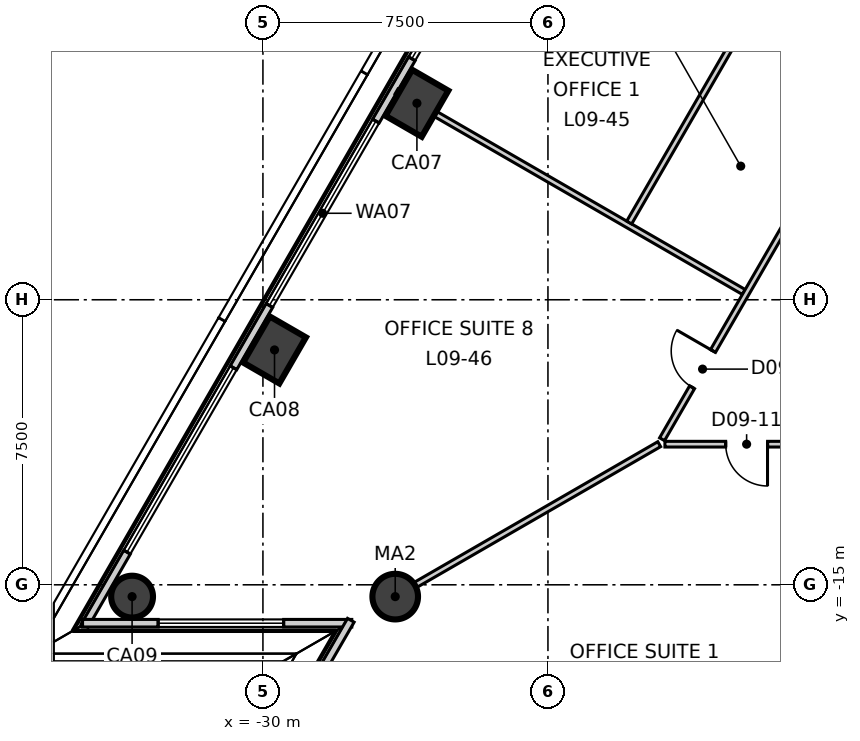
"""IFC4 building model, lengths in metres.
Left out: names, types, materials, properties, quantities, classifications, styles, units other than length and angle.
Written with IfcOpenShell. Run it as: python <this file> out.ifc"""

import sys

from ifc_helpers import new_model, si_unit, direction, frame, frame_2d, origin, origin_2d, place, context, subcontext, project, spatial, rectangle, circle, extrude, element, fill, save


model = new_model("IFC4")
c1 = context("Model", 3, precision=1e-05, world=origin(), true_north=direction((0.0, 1.0)))
c2 = subcontext(c1, "Body", "Model", "MODEL_VIEW")
j1 = project(units=[si_unit("LENGTHUNIT", "METRE"), si_unit("PLANEANGLEUNIT", "RADIAN")], contexts=[c1])
p1 = place(None, origin())
s1 = spatial("IfcSite", under=j1, at=p1, CompositionType="ELEMENT")
p2 = place(p1, origin())
s2 = spatial("IfcBuilding", under=s1, at=p2, CompositionType="ELEMENT")
p3 = place(p2, frame((0.0, 0.0, 47.3)))
s3 = spatial("IfcBuildingStorey", under=s2, at=p3, CompositionType="ELEMENT", Elevation=47.3)
for number, where, z_axis, x_axis in (
    (1, (-25.948, -2.329, -0.3), (0.0, 0.0, 1.0), (0.5, 0.866, 0.0)),
    (2, (-29.695, -8.82, -0.3), (0.0, 0.0, 1.0), (0.5, 0.866, 0.0)),
):
    element("IfcColumn", number, at=place(p3, frame(where, z_axis=z_axis, x_axis=x_axis)), inside=s3, PredefinedType="COLUMN", context=c2, shape_type="SweptSolid", body=[
        extrude(rectangle(XDim=1.4, YDim=1.1, at=origin_2d()), origin(), (0.0, 0.0, 1.0), 4.0),
    ])
p4 = place(p3, frame((-33.443, -15.311, -0.3), z_axis=(0.0, 0.0, 1.0), x_axis=(0.5, 0.866025403784, 0.0)))
e3 = element("IfcColumn", 3, at=p4, inside=s3, PredefinedType="COLUMN", context=c2, shape_type="SweptSolid", body=[
    extrude(circle(Radius=0.55, at=origin_2d()), origin(), (0.0, 0.0, 1.0), 4.0),
])
p5 = place(p3, frame((-26.519, -15.311, -0.3), z_axis=(0.0, 0.0, 1.0), x_axis=(1.0, 0.0, 0.0)))
e4 = element("IfcColumn", 4, at=p5, inside=s3, PredefinedType="COLUMN", context=c2, shape_type="SweptSolid", body=[
    extrude(circle(Radius=0.6, at=origin_2d()), origin(), (0.0, 0.0, 1.0), 4.0),
])
p6 = place(p3, frame((-3.417, 38.096, 0.0), z_axis=(0.0, 0.0, 1.0), x_axis=(-0.500000412988, -0.866025165346, 0.0)))
e5 = element("IfcWall", 5, at=p6, inside=s3, PredefinedType="ELEMENTEDWALL", context=c2, shape_type="SweptSolid", body=[
    extrude(rectangle(XDim=62.548, YDim=0.2, at=frame_2d((31.274, 0.0))), origin(), (0.0, 0.0, 1.0), 3.7),
])
p7 = place(p6, frame((2.25, 0.0, 0.9)))
e6 = element("IfcOpeningElement", 6, at=p7, cuts=e5, PredefinedType="OPENING", context=c2, shape_type="SweptSolid", body=[
    extrude(rectangle(XDim=5.6, YDim=2.5, at=frame_2d((2.8, 1.25))), frame((0.0, 0.11, 0.0), z_axis=(0.0, -1.0, 0.0), x_axis=(1.0, 0.0, 0.0)), (0.0, 0.0, 1.0), 0.22),
])
p8 = place(p6, frame((9.745, 0.0, 0.9)))
e7 = element("IfcOpeningElement", 7, at=p8, cuts=e5, PredefinedType="OPENING", context=c2, shape_type="SweptSolid", body=[
    extrude(rectangle(XDim=5.6, YDim=2.5, at=frame_2d((2.8, 1.25))), frame((0.0, 0.11, 0.0), z_axis=(0.0, -1.0, 0.0), x_axis=(1.0, 0.0, 0.0)), (0.0, 0.0, 1.0), 0.22),
])
p9 = place(p6, frame((17.241, 0.0, 0.9)))
e8 = element("IfcOpeningElement", 8, at=p9, cuts=e5, PredefinedType="OPENING", context=c2, shape_type="SweptSolid", body=[
    extrude(rectangle(XDim=5.6, YDim=2.5, at=frame_2d((2.8, 1.25))), frame((0.0, 0.11, 0.0), z_axis=(0.0, -1.0, 0.0), x_axis=(1.0, 0.0, 0.0)), (0.0, 0.0, 1.0), 0.22),
])
p10 = place(p6, frame((24.736, 0.0, 0.9)))
e9 = element("IfcOpeningElement", 9, at=p10, cuts=e5, PredefinedType="OPENING", context=c2, shape_type="SweptSolid", body=[
    extrude(rectangle(XDim=5.6, YDim=2.5, at=frame_2d((2.8, 1.25))), frame((0.0, 0.11, 0.0), z_axis=(0.0, -1.0, 0.0), x_axis=(1.0, 0.0, 0.0)), (0.0, 0.0, 1.0), 0.22),
])
p11 = place(p6, frame((32.231, 0.0, 0.9)))
e10 = element("IfcOpeningElement", 10, at=p11, cuts=e5, PredefinedType="OPENING", context=c2, shape_type="SweptSolid", body=[
    extrude(rectangle(XDim=5.6, YDim=2.5, at=frame_2d((2.8, 1.25))), frame((0.0, 0.11, 0.0), z_axis=(0.0, -1.0, 0.0), x_axis=(1.0, 0.0, 0.0)), (0.0, 0.0, 1.0), 0.22),
])
p12 = place(p6, frame((39.727, 0.0, 0.9)))
e11 = element("IfcOpeningElement", 11, at=p12, cuts=e5, PredefinedType="OPENING", context=c2, shape_type="SweptSolid", body=[
    extrude(rectangle(XDim=5.6, YDim=2.5, at=frame_2d((2.8, 1.25))), frame((0.0, 0.11, 0.0), z_axis=(0.0, -1.0, 0.0), x_axis=(1.0, 0.0, 0.0)), (0.0, 0.0, 1.0), 0.22),
])
p13 = place(p6, frame((47.222, 0.0, 0.9)))
e12 = element("IfcOpeningElement", 12, at=p13, cuts=e5, PredefinedType="OPENING", context=c2, shape_type="SweptSolid", body=[
    extrude(rectangle(XDim=5.6, YDim=2.5, at=frame_2d((2.8, 1.25))), frame((0.0, 0.11, 0.0), z_axis=(0.0, -1.0, 0.0), x_axis=(1.0, 0.0, 0.0)), (0.0, 0.0, 1.0), 0.22),
])
p14 = place(p6, frame((54.717, 0.0, 0.9)))
e13 = element("IfcOpeningElement", 13, at=p14, cuts=e5, PredefinedType="OPENING", context=c2, shape_type="SweptSolid", body=[
    extrude(rectangle(XDim=5.6, YDim=2.5, at=frame_2d((2.8, 1.25))), frame((0.0, 0.11, 0.0), z_axis=(0.0, -1.0, 0.0), x_axis=(1.0, 0.0, 0.0)), (0.0, 0.0, 1.0), 0.22),
])
p15 = place(p3, frame((-34.746, -16.011, 0.0), z_axis=(0.0, 0.0, 1.0), x_axis=(1.0, 0.0, 0.0)))
e14 = element("IfcWall", 14, at=p15, inside=s3, PredefinedType="ELEMENTEDWALL", context=c2, shape_type="SweptSolid", body=[
    extrude(rectangle(XDim=7.084, YDim=0.2, at=frame_2d((3.542, 0.0))), origin(), (0.0, 0.0, 1.0), 3.7),
])
p16 = place(p15, frame((1.99, 0.0, 0.9)))
e15 = element("IfcOpeningElement", 15, at=p16, cuts=e14, PredefinedType="OPENING", context=c2, shape_type="SweptSolid", body=[
    extrude(rectangle(XDim=3.3, YDim=2.5, at=frame_2d((1.65, 1.25))), frame((0.0, 0.11, 0.0), z_axis=(0.0, -1.0, 0.0), x_axis=(1.0, 0.0, 0.0)), (0.0, 0.0, 1.0), 0.22),
])
p17 = place(p3, frame((-27.687, -15.933, 0.0), z_axis=(0.0, 0.0, 1.0), x_axis=(-0.499993928037, -0.866028909405, 0.0)))
e16 = element("IfcWall", 16, at=p17, inside=s3, PredefinedType="ELEMENTEDWALL", context=c2, shape_type="SweptSolid", body=[
    extrude(rectangle(XDim=7.084, YDim=0.2, at=frame_2d((3.542, 0.0))), origin(), (0.0, 0.0, 1.0), 3.7),
])
p18 = place(p17, frame((1.39, 0.0, 0.9)))
e17 = element("IfcOpeningElement", 17, at=p18, cuts=e16, PredefinedType="OPENING", context=c2, shape_type="SweptSolid", body=[
    extrude(rectangle(XDim=3.3, YDim=2.5, at=frame_2d((1.65, 1.25))), frame((0.0, 0.11, 0.0), z_axis=(0.0, -1.0, 0.0), x_axis=(1.0, 0.0, 0.0)), (0.0, 0.0, 1.0), 0.22),
])
p19 = place(p3, frame((-27.056, -15.621, 0.0), z_axis=(0.0, 0.0, 1.0), x_axis=(0.866014334421, 0.50001917221, 0.0)))
e18 = element("IfcWall", 18, at=p19, inside=s3, PredefinedType="PARTITIONING", context=c2, shape_type="SweptSolid", body=[
    extrude(rectangle(XDim=8.642, YDim=0.15, at=frame_2d((4.321, 0.0))), origin(), (0.0, 0.0, 1.0), 3.1),
])
p20 = place(p3, frame((-26.485, -2.019, 0.0), z_axis=(0.0, 0.0, 1.0), x_axis=(0.866027613664, -0.499996172356, 0.0)))
e19 = element("IfcWall", 19, at=p20, inside=s3, PredefinedType="PARTITIONING", context=c2, shape_type="SweptSolid", body=[
    extrude(rectangle(XDim=10.552, YDim=0.15, at=frame_2d((5.276, 0.0))), origin(), (0.0, 0.0, 1.0), 3.7),
])
p21 = place(p3, frame((-19.497, -11.17, 0.0), z_axis=(0.0, 0.0, 1.0), x_axis=(0.499998854553, 0.866026065108, 0.0)))
e20 = element("IfcWall", 20, at=p21, inside=s3, PredefinedType="PARTITIONING", context=c2, shape_type="SweptSolid", body=[
    extrude(rectangle(XDim=38.994, YDim=0.15, at=frame_2d((19.497, 0.0))), origin(), (0.0, 0.0, 1.0), 3.7),
])
p22 = place(p21, frame((36.144, 0.0, 0.0)))
e21 = element("IfcOpeningElement", 21, at=p22, cuts=e20, PredefinedType="OPENING", context=c2, shape_type="SweptSolid", body=[
    extrude(rectangle(XDim=1.1, YDim=2.1, at=frame_2d((0.55, 1.05))), frame((0.0, 0.085, 0.0), z_axis=(0.0, -1.0, 0.0), x_axis=(1.0, 0.0, 0.0)), (0.0, 0.0, 1.0), 0.17),
])
p23 = place(p21, frame((21.963, 0.0, 0.0)))
e22 = element("IfcOpeningElement", 22, at=p23, cuts=e20, PredefinedType="OPENING", context=c2, shape_type="SweptSolid", body=[
    extrude(rectangle(XDim=1.1, YDim=2.1, at=frame_2d((0.55, 1.05))), frame((0.0, 0.085, 0.0), z_axis=(0.0, -1.0, 0.0), x_axis=(1.0, 0.0, 0.0)), (0.0, 0.0, 1.0), 0.17),
])
p24 = place(p21, frame((32.363, 0.0, 0.0)))
e23 = element("IfcOpeningElement", 23, at=p24, cuts=e20, PredefinedType="OPENING", context=c2, shape_type="SweptSolid", body=[
    extrude(rectangle(XDim=0.9, YDim=2.1, at=frame_2d((0.45, 1.05))), frame((0.0, 0.085, 0.0), z_axis=(0.0, -1.0, 0.0), x_axis=(1.0, 0.0, 0.0)), (0.0, 0.0, 1.0), 0.17),
])
p25 = place(p21, frame((29.163, 0.0, 0.0)))
e24 = element("IfcOpeningElement", 24, at=p25, cuts=e20, PredefinedType="OPENING", context=c2, shape_type="SweptSolid", body=[
    extrude(rectangle(XDim=0.9, YDim=2.1, at=frame_2d((0.45, 1.05))), frame((0.0, 0.085, 0.0), z_axis=(0.0, -1.0, 0.0), x_axis=(1.0, 0.0, 0.0)), (0.0, 0.0, 1.0), 0.17),
])
p26 = place(p21, frame((26.263, 0.0, 0.0)))
e25 = element("IfcOpeningElement", 25, at=p26, cuts=e20, PredefinedType="OPENING", context=c2, shape_type="SweptSolid", body=[
    extrude(rectangle(XDim=1.0, YDim=2.1, at=frame_2d((0.5, 1.05))), frame((0.0, 0.085, 0.0), z_axis=(0.0, -1.0, 0.0), x_axis=(1.0, 0.0, 0.0)), (0.0, 0.0, 1.0), 0.17),
])
p27 = place(p21, frame((11.373, 0.0, 0.0)))
e26 = element("IfcOpeningElement", 26, at=p27, cuts=e20, PredefinedType="OPENING", context=c2, shape_type="SweptSolid", body=[
    extrude(rectangle(XDim=1.1, YDim=2.1, at=frame_2d((0.55, 1.05))), frame((0.0, 0.085, 0.0), z_axis=(0.0, -1.0, 0.0), x_axis=(1.0, 0.0, 0.0)), (0.0, 0.0, 1.0), 0.17),
])
p28 = place(p21, frame((1.581, 0.0, 0.0)))
e27 = element("IfcOpeningElement", 27, at=p28, cuts=e20, PredefinedType="OPENING", context=c2, shape_type="SweptSolid", body=[
    extrude(rectangle(XDim=1.1, YDim=2.1, at=frame_2d((0.55, 1.05))), frame((0.0, 0.085, 0.0), z_axis=(0.0, -1.0, 0.0), x_axis=(1.0, 0.0, 0.0)), (0.0, 0.0, 1.0), 0.17),
])
p29 = place(p3, frame((-19.422, -11.3, 0.0), z_axis=(0.0, 0.0, 1.0), x_axis=(1.0, 0.0, 0.0)))
e28 = element("IfcWall", 28, at=p29, inside=s3, PredefinedType="PARTITIONING", context=c2, shape_type="SweptSolid", body=[
    extrude(rectangle(XDim=38.994, YDim=0.15, at=frame_2d((19.497, 0.0))), origin(), (0.0, 0.0, 1.0), 3.7),
])
p30 = place(p29, frame((1.6, 0.0, 0.0)))
e29 = element("IfcOpeningElement", 29, at=p30, cuts=e28, PredefinedType="OPENING", context=c2, shape_type="SweptSolid", body=[
    extrude(rectangle(XDim=1.1, YDim=2.1, at=frame_2d((0.55, 1.05))), frame((0.0, 0.085, 0.0), z_axis=(0.0, -1.0, 0.0), x_axis=(1.0, 0.0, 0.0)), (0.0, 0.0, 1.0), 0.17),
])
p31 = place(p29, frame((7.682, 0.0, 0.0)))
e30 = element("IfcOpeningElement", 30, at=p31, cuts=e28, PredefinedType="OPENING", context=c2, shape_type="SweptSolid", body=[
    extrude(rectangle(XDim=1.0, YDim=2.1, at=frame_2d((0.5, 1.05))), frame((0.0, 0.085, 0.0), z_axis=(0.0, -1.0, 0.0), x_axis=(1.0, 0.0, 0.0)), (0.0, 0.0, 1.0), 0.17),
])
p32 = place(p29, frame((15.177, 0.0, 0.0)))
e31 = element("IfcOpeningElement", 31, at=p32, cuts=e28, PredefinedType="OPENING", context=c2, shape_type="SweptSolid", body=[
    extrude(rectangle(XDim=1.0, YDim=2.1, at=frame_2d((0.5, 1.05))), frame((0.0, 0.085, 0.0), z_axis=(0.0, -1.0, 0.0), x_axis=(1.0, 0.0, 0.0)), (0.0, 0.0, 1.0), 0.17),
])
p33 = place(p29, frame((29.372, 0.0, 0.0)))
e32 = element("IfcOpeningElement", 32, at=p33, cuts=e28, PredefinedType="OPENING", context=c2, shape_type="SweptSolid", body=[
    extrude(rectangle(XDim=1.1, YDim=2.1, at=frame_2d((0.55, 1.05))), frame((0.0, 0.085, 0.0), z_axis=(0.0, -1.0, 0.0), x_axis=(1.0, 0.0, 0.0)), (0.0, 0.0, 1.0), 0.17),
])
p34 = place(p29, frame((20.772, 0.0, 0.0)))
e33 = element("IfcOpeningElement", 33, at=p34, cuts=e28, PredefinedType="OPENING", context=c2, shape_type="SweptSolid", body=[
    extrude(rectangle(XDim=0.9, YDim=2.1, at=frame_2d((0.45, 1.05))), frame((0.0, 0.085, 0.0), z_axis=(0.0, -1.0, 0.0), x_axis=(1.0, 0.0, 0.0)), (0.0, 0.0, 1.0), 0.17),
])
p35 = place(p29, frame((23.772, 0.0, 0.0)))
e34 = element("IfcOpeningElement", 34, at=p35, cuts=e28, PredefinedType="OPENING", context=c2, shape_type="SweptSolid", body=[
    extrude(rectangle(XDim=0.9, YDim=2.1, at=frame_2d((0.45, 1.05))), frame((0.0, 0.085, 0.0), z_axis=(0.0, -1.0, 0.0), x_axis=(1.0, 0.0, 0.0)), (0.0, 0.0, 1.0), 0.17),
])
p36 = place(p29, frame((36.163, 0.0, 0.0)))
e35 = element("IfcOpeningElement", 35, at=p36, cuts=e28, PredefinedType="OPENING", context=c2, shape_type="SweptSolid", body=[
    extrude(rectangle(XDim=1.1, YDim=2.1, at=frame_2d((0.55, 1.05))), frame((0.0, 0.085, 0.0), z_axis=(0.0, -1.0, 0.0), x_axis=(1.0, 0.0, 0.0)), (0.0, 0.0, 1.0), 0.17),
])
p37 = place(p3, frame((-20.362, -5.468, 0.0), z_axis=(0.0, 0.0, 1.0), x_axis=(0.49999393442, 0.866028905721, 0.0)))
e36 = element("IfcWall", 36, at=p37, inside=s3, PredefinedType="PARTITIONING", context=c2, shape_type="SweptSolid", body=[
    extrude(rectangle(XDim=14.843, YDim=0.15, at=frame_2d((7.421, 0.0))), origin(), (0.0, 0.0, 1.0), 3.7),
])
p38 = place(p37, frame((6.967, 0.0, 0.0)))
e37 = element("IfcOpeningElement", 37, at=p38, cuts=e36, PredefinedType="OPENING", context=c2, shape_type="SweptSolid", body=[
    extrude(rectangle(XDim=1.0, YDim=2.1, at=frame_2d((0.5, 1.05))), frame((0.0, 0.085, 0.0), z_axis=(0.0, -1.0, 0.0), x_axis=(1.0, 0.0, 0.0)), (0.0, 0.0, 1.0), 0.17),
])
p39 = place(p12, origin())
e38 = element("IfcWindow", 38, at=p39, inside=s3, PartitioningType="SINGLE_PANEL", PredefinedType="WINDOW", context=c2, shape_type="SweptSolid", body=[
    extrude(rectangle(XDim=5.6, YDim=2.5, at=frame_2d((2.8, 1.25))), frame((0.0, 0.03, 0.0), z_axis=(0.0, -1.0, 0.0), x_axis=(1.0, 0.0, 0.0)), (0.0, 0.0, 1.0), 0.06),
])
fill(e11, e38)
p40 = place(p13, origin())
e39 = element("IfcWindow", 39, at=p40, inside=s3, PartitioningType="SINGLE_PANEL", PredefinedType="WINDOW", context=c2, shape_type="SweptSolid", body=[
    extrude(rectangle(XDim=5.6, YDim=2.5, at=frame_2d((2.8, 1.25))), frame((0.0, 0.03, 0.0), z_axis=(0.0, -1.0, 0.0), x_axis=(1.0, 0.0, 0.0)), (0.0, 0.0, 1.0), 0.06),
])
fill(e12, e39)
p41 = place(p14, origin())
e40 = element("IfcWindow", 40, at=p41, inside=s3, PartitioningType="SINGLE_PANEL", PredefinedType="WINDOW", context=c2, shape_type="SweptSolid", body=[
    extrude(rectangle(XDim=5.6, YDim=2.5, at=frame_2d((2.8, 1.25))), frame((0.0, 0.03, 0.0), z_axis=(0.0, -1.0, 0.0), x_axis=(1.0, 0.0, 0.0)), (0.0, 0.0, 1.0), 0.06),
])
fill(e13, e40)
p42 = place(p16, origin())
e41 = element("IfcWindow", 41, at=p42, inside=s3, PartitioningType="SINGLE_PANEL", PredefinedType="WINDOW", context=c2, shape_type="SweptSolid", body=[
    extrude(rectangle(XDim=3.3, YDim=2.5, at=frame_2d((1.65, 1.25))), frame((0.0, 0.03, 0.0), z_axis=(0.0, -1.0, 0.0), x_axis=(1.0, 0.0, 0.0)), (0.0, 0.0, 1.0), 0.06),
])
fill(e15, e41)
p43 = place(p30, origin())
e42 = element("IfcDoor", 42, at=p43, inside=s3, OperationType="SINGLE_SWING_RIGHT", PredefinedType="DOOR", context=c2, shape_type="SweptSolid", body=[
    extrude(rectangle(XDim=1.1, YDim=2.1, at=frame_2d((0.55, 1.05))), frame((0.0, 0.025, 0.0), z_axis=(0.0, -1.0, 0.0), x_axis=(1.0, 0.0, 0.0)), (0.0, 0.0, 1.0), 0.05),
])
fill(e29, e42)
p44 = place(p28, origin())
e43 = element("IfcDoor", 43, at=p44, inside=s3, OperationType="SINGLE_SWING_LEFT", PredefinedType="DOOR", context=c2, shape_type="SweptSolid", body=[
    extrude(rectangle(XDim=1.1, YDim=2.1, at=frame_2d((0.55, 1.05))), frame((0.0, 0.025, 0.0), z_axis=(0.0, -1.0, 0.0), x_axis=(1.0, 0.0, 0.0)), (0.0, 0.0, 1.0), 0.05),
])
fill(e27, e43)
save(model, sys.argv[1])
